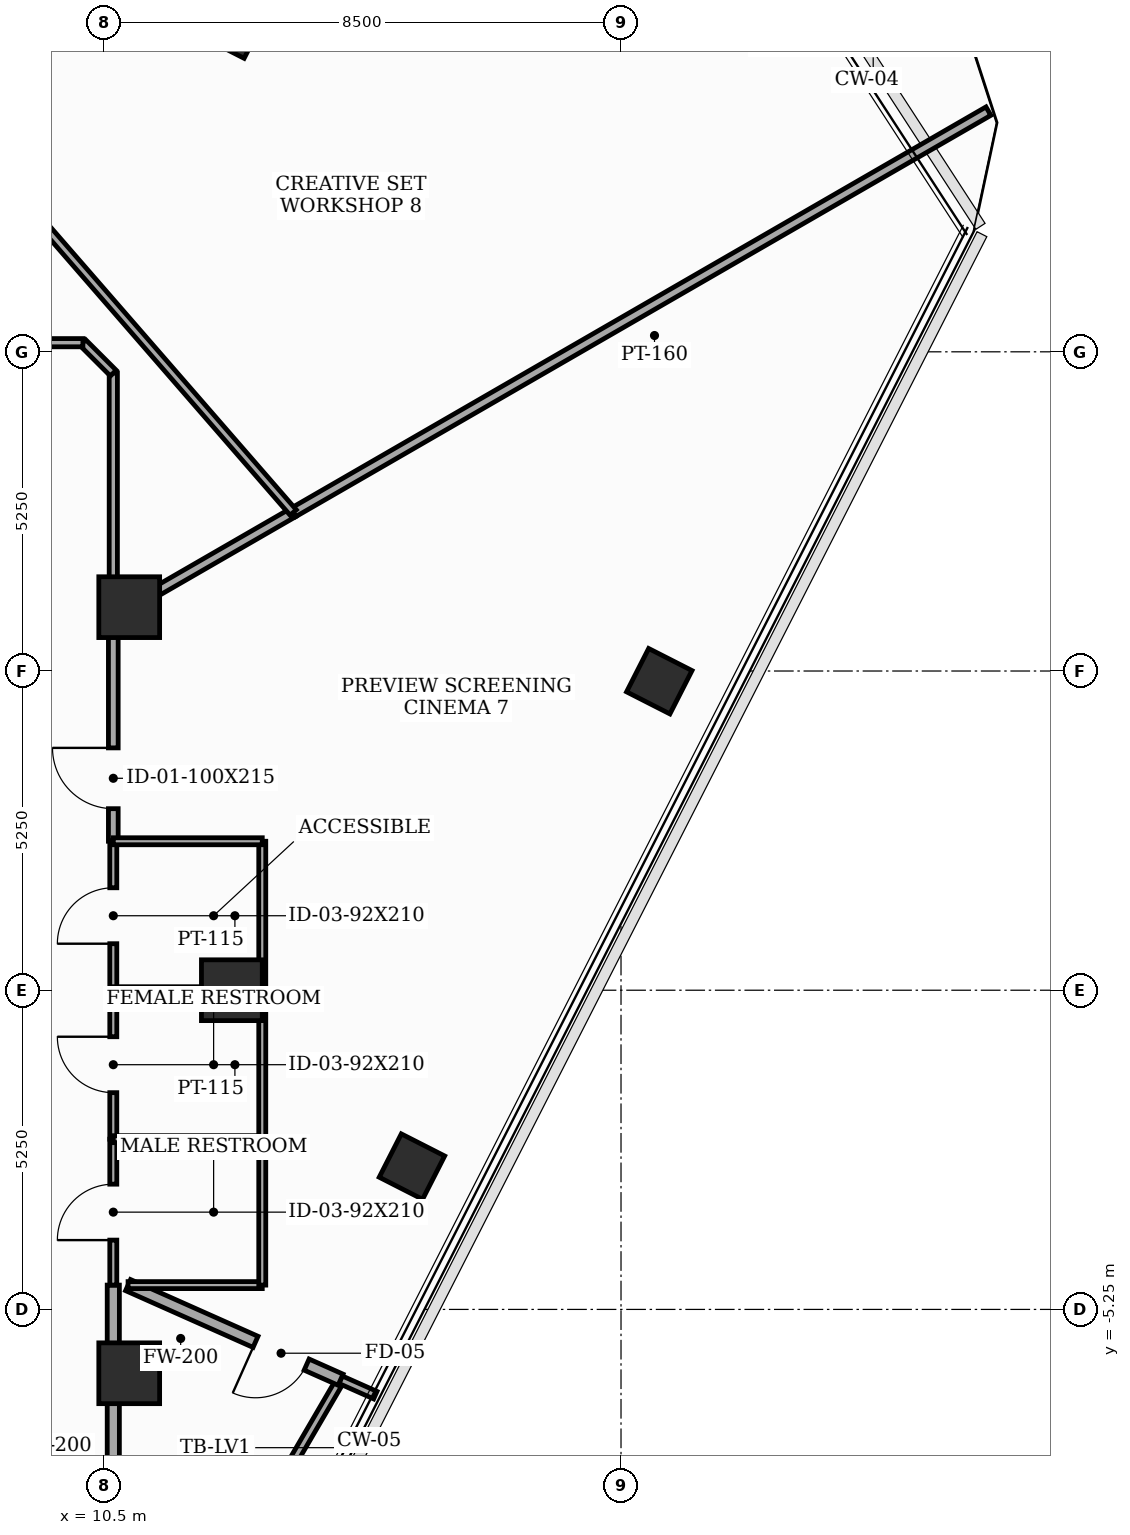
"""IFC4 building model, lengths in metres.
Left out: names, types, materials, properties, quantities, classifications, styles, units other than length and angle.
Written with IfcOpenShell. Run it as: python <this file> out.ifc"""

import sys

from ifc_helpers import new_model, si_unit, direction, frame, frame_2d, origin, origin_2d, place, context, subcontext, project, spatial, rectangle, extrude, element, fill, save


model = new_model("IFC4")
c1 = context("Model", 3, precision=1e-05, world=origin(), true_north=direction((0.0, 1.0)))
c2 = subcontext(c1, "Body", "Model", "MODEL_VIEW")
j1 = project(units=[si_unit("LENGTHUNIT", "METRE"), si_unit("PLANEANGLEUNIT", "RADIAN")], contexts=[c1])
p1 = place(None, origin())
s1 = spatial("IfcSite", under=j1, at=p1, CompositionType="ELEMENT")
p2 = place(p1, origin())
s2 = spatial("IfcBuilding", under=s1, at=p2, CompositionType="ELEMENT")
p3 = place(p2, frame((0.0, 0.0, 274.4)))
s3 = spatial("IfcBuildingStorey", under=s2, at=p3, CompositionType="ELEMENT", Elevation=274.4)
for number, where, z_axis, x_axis in (
    (1, (12.6, 0.0, 0.0), (0.0, 0.0, 1.0), (1.0, 0.0, 0.0)),
    (2, (10.912, 6.3, 0.0), (0.0, 0.0, 1.0), (1.0, 0.0, 0.0)),
    (3, (10.912, -6.3, 0.0), (0.0, 0.0, 1.0), (1.0, 0.0, 0.0)),
):
    element("IfcColumn", number, at=place(p3, frame(where, z_axis=z_axis, x_axis=x_axis)), inside=s3, PredefinedType="COLUMN", context=c2, shape_type="SweptSolid", body=[
        extrude(rectangle(XDim=1.0, YDim=1.0, at=origin_2d()), origin(), (0.0, 0.0, 1.0), 3.7),
    ])
for number, where, z_axis, x_axis in (
    (4, (15.562, -2.901, 0.0), (0.0, 0.0, 1.0), (0.454, 0.891, 0.0)),
    (5, (19.629, 5.082, 0.0), (0.0, 0.0, 1.0), (0.454, 0.891, 0.0)),
    (6, (12.627, 15.865, 0.0), (0.0, 0.0, 1.0), (0.454, 0.891, 0.0)),
):
    element("IfcColumn", number, at=place(p3, frame(where, z_axis=z_axis, x_axis=x_axis)), inside=s3, PredefinedType="COLUMN", context=c2, shape_type="SweptSolid", body=[
        extrude(rectangle(XDim=0.8, YDim=0.8, at=origin_2d()), origin(), (0.0, 0.0, 1.0), 3.7),
    ])
p4 = place(p3, frame((10.65, -10.15, 0.0), z_axis=(0.0, 0.0, 1.0), x_axis=(0.0, 1.0, 0.0)))
e7 = element("IfcWall", 7, at=p4, inside=s3, PredefinedType="SOLIDWALL", context=c2, shape_type="SweptSolid", body=[
    extrude(rectangle(XDim=5.3, YDim=0.2, at=frame_2d((2.65, 0.0))), origin(), (0.0, 0.0, 1.0), 2.045),
])
p5 = place(p3, frame((10.65, -4.85, 0.0), z_axis=(0.0, 0.0, 1.0), x_axis=(0.0, 1.0, 0.0)))
e8 = element("IfcWall", 8, at=p5, inside=s3, PredefinedType="PARTITIONING", context=c2, shape_type="SweptSolid", body=[
    extrude(rectangle(XDim=2.4, YDim=0.115, at=frame_2d((1.2, 0.0))), origin(), (0.0, 0.0, 1.0), 3.46),
])
p6 = place(p5, frame((0.74, 0.0, 0.0)))
e9 = element("IfcOpeningElement", 9, at=p6, cuts=e8, PredefinedType="OPENING", context=c2, shape_type="SweptSolid", body=[
    extrude(rectangle(XDim=0.92, YDim=2.1, at=frame_2d((0.46, 1.05))), frame((0.0, 0.067, 0.0), z_axis=(0.0, -1.0, 0.0), x_axis=(1.0, 0.0, 0.0)), (0.0, 0.0, 1.0), 0.135),
])
p7 = place(p3, frame((10.65, -2.45, 0.0), z_axis=(0.0, 0.0, 1.0), x_axis=(0.0, 1.0, 0.0)))
e10 = element("IfcWall", 10, at=p7, inside=s3, PredefinedType="PARTITIONING", context=c2, shape_type="SweptSolid", body=[
    extrude(rectangle(XDim=2.45, YDim=0.115, at=frame_2d((1.225, 0.0))), origin(), (0.0, 0.0, 1.0), 2.845),
])
p8 = place(p7, frame((0.765, 0.0, 0.0)))
e11 = element("IfcOpeningElement", 11, at=p8, cuts=e10, PredefinedType="OPENING", context=c2, shape_type="SweptSolid", body=[
    extrude(rectangle(XDim=0.92, YDim=2.1, at=frame_2d((0.46, 1.05))), frame((0.0, 0.067, 0.0), z_axis=(0.0, -1.0, 0.0), x_axis=(1.0, 0.0, 0.0)), (0.0, 0.0, 1.0), 0.135),
])
p9 = place(p3, frame((10.65, 0.0, 0.0), z_axis=(0.0, 0.0, 1.0), x_axis=(0.0, 1.0, 0.0)))
e12 = element("IfcWall", 12, at=p9, inside=s3, PredefinedType="PARTITIONING", context=c2, shape_type="SweptSolid", body=[
    extrude(rectangle(XDim=2.45, YDim=0.115, at=frame_2d((1.225, 0.0))), origin(), (0.0, 0.0, 1.0), 2.845),
])
p10 = place(p9, frame((0.765, 0.0, 0.0)))
e13 = element("IfcOpeningElement", 13, at=p10, cuts=e12, PredefinedType="OPENING", context=c2, shape_type="SweptSolid", body=[
    extrude(rectangle(XDim=0.92, YDim=2.1, at=frame_2d((0.46, 1.05))), frame((0.0, 0.067, 0.0), z_axis=(0.0, -1.0, 0.0), x_axis=(1.0, 0.0, 0.0)), (0.0, 0.0, 1.0), 0.135),
])
p11 = place(p3, frame((10.65, 2.45, 0.0), z_axis=(0.0, 0.0, 1.0), x_axis=(0.0, 1.0, 0.0)))
e14 = element("IfcWall", 14, at=p11, inside=s3, PredefinedType="PARTITIONING", context=c2, shape_type="SweptSolid", body=[
    extrude(rectangle(XDim=3.699, YDim=0.16, at=frame_2d((1.85, 0.0))), origin(), (0.0, 0.0, 1.0), 3.46),
])
p12 = place(p11, frame((0.536, 0.0, 0.0)))
e15 = element("IfcOpeningElement", 15, at=p12, cuts=e14, PredefinedType="OPENING", context=c2, shape_type="SweptSolid", body=[
    extrude(rectangle(XDim=1.0, YDim=2.15, at=frame_2d((0.5, 1.075))), frame((0.0, 0.09, 0.0), z_axis=(0.0, -1.0, 0.0), x_axis=(1.0, 0.0, 0.0)), (0.0, 0.0, 1.0), 0.18),
])
p13 = place(p3, frame((10.65, 6.149, 0.0), z_axis=(0.0, 0.0, 1.0), x_axis=(0.0, 1.0, 0.0)))
e16 = element("IfcWall", 16, at=p13, inside=s3, PredefinedType="PARTITIONING", context=c2, shape_type="SweptSolid", body=[
    extrude(rectangle(XDim=4.001, YDim=0.135, at=frame_2d((2.0, 0.0))), origin(), (0.0, 0.0, 1.0), 2.845),
])
p14 = place(p3, frame((10.65, 10.15, 0.0), z_axis=(0.0, 0.0, 1.0), x_axis=(-0.707106781187, 0.707106781187, 0.0)))
e17 = element("IfcWall", 17, at=p14, inside=s3, PredefinedType="PARTITIONING", context=c2, shape_type="SweptSolid", body=[
    extrude(rectangle(XDim=0.707, YDim=0.135, at=frame_2d((0.354, 0.0))), origin(), (0.0, 0.0, 1.0), 3.46),
])
p15 = place(p3, frame((10.15, 10.65, 0.0), z_axis=(0.0, 0.0, 1.0), x_axis=(-1.0, 0.0, 0.0)))
e18 = element("IfcWall", 18, at=p15, inside=s3, PredefinedType="PARTITIONING", context=c2, shape_type="SweptSolid", body=[
    extrude(rectangle(XDim=11.3, YDim=0.135, at=frame_2d((5.65, 0.0))), origin(), (0.0, 0.0, 1.0), 2.045),
])
p16 = place(p15, frame((6.531, 0.0, 0.0)))
e19 = element("IfcOpeningElement", 19, at=p16, cuts=e18, PredefinedType="OPENING", context=c2, shape_type="SweptSolid", body=[
    extrude(rectangle(XDim=0.95, YDim=2.0, at=frame_2d((0.475, 1.0))), frame((0.0, 0.077, 0.0), z_axis=(0.0, -1.0, 0.0), x_axis=(1.0, 0.0, 0.0)), (0.0, 0.0, 1.0), 0.155),
])
p17 = place(p3, frame((14.388, -6.406, 0.0), z_axis=(0.0, 0.0, 1.0), x_axis=(-0.50381969712, -0.863808840424, 0.0)))
e20 = element("IfcWall", 20, at=p17, inside=s3, PredefinedType="PARTITIONING", context=c2, shape_type="SweptSolid", body=[
    extrude(rectangle(XDim=3.845, YDim=0.135, at=frame_2d((1.922, 0.0))), origin(), (0.0, 0.0, 1.0), 2.045),
])
p18 = place(p3, frame((14.959, -6.66, 0.0), z_axis=(0.0, 0.0, 1.0), x_axis=(-0.91373105304, 0.40631953277, 0.0)))
e21 = element("IfcWall", 21, at=p18, inside=s3, PredefinedType="PARTITIONING", context=c2, shape_type="SweptSolid", body=[
    extrude(rectangle(XDim=0.625, YDim=0.135, at=frame_2d((0.313, 0.0))), origin(), (0.0, 0.0, 1.0), 3.46),
])
p19 = place(p3, frame((14.388, -6.406, 0.0), z_axis=(0.0, 0.0, 1.0), x_axis=(-0.913556095718, 0.406712748726, 0.0)))
e22 = element("IfcWall", 22, at=p19, inside=s3, PredefinedType="SOLIDWALL", context=c2, shape_type="SweptSolid", body=[
    extrude(rectangle(XDim=3.826, YDim=0.2, at=frame_2d((1.913, 0.0))), origin(), (0.0, 0.0, 1.0), 2.045),
])
p20 = place(p19, frame((0.611, 0.0, 0.0)))
e23 = element("IfcOpeningElement", 23, at=p20, cuts=e22, PredefinedType="OPENING", context=c2, shape_type="SweptSolid", body=[
    extrude(rectangle(XDim=0.92, YDim=2.0, at=frame_2d((0.46, 1.0))), frame((0.0, 0.11, 0.0), z_axis=(0.0, -1.0, 0.0), x_axis=(1.0, 0.0, 0.0)), (0.0, 0.0, 1.0), 0.22),
])
p21 = place(p3, frame((13.1, -2.45, 0.0), z_axis=(0.0, 0.0, 1.0), x_axis=(-1.0, 0.0, 0.0)))
e24 = element("IfcWall", 24, at=p21, inside=s3, PredefinedType="PARTITIONING", context=c2, shape_type="SweptSolid", body=[
    extrude(rectangle(XDim=2.45, YDim=0.115, at=frame_2d((1.225, 0.0))), origin(), (0.0, 0.0, 1.0), 2.845),
])
p22 = place(p3, frame((10.893, -4.85, 0.0), z_axis=(0.0, 0.0, 1.0), x_axis=(1.0, 0.0, 0.0)))
e25 = element("IfcWall", 25, at=p22, inside=s3, PredefinedType="PARTITIONING", context=c2, shape_type="SweptSolid", body=[
    extrude(rectangle(XDim=2.207, YDim=0.115, at=frame_2d((1.104, 0.0))), origin(), (0.0, 0.0, 1.0), 2.845),
])
p23 = place(p3, frame((13.1, -4.85, 0.0), z_axis=(0.0, 0.0, 1.0), x_axis=(0.0, 1.0, 0.0)))
e26 = element("IfcWall", 26, at=p23, inside=s3, PredefinedType="PARTITIONING", context=c2, shape_type="SweptSolid", body=[
    extrude(rectangle(XDim=2.4, YDim=0.115, at=frame_2d((1.2, 0.0))), origin(), (0.0, 0.0, 1.0), 3.46),
])
p24 = place(p3, frame((13.1, 0.0, 0.0), z_axis=(0.0, 0.0, 1.0), x_axis=(-1.0, 0.0, 0.0)))
e27 = element("IfcWall", 27, at=p24, inside=s3, PredefinedType="PARTITIONING", context=c2, shape_type="SweptSolid", body=[
    extrude(rectangle(XDim=2.45, YDim=0.115, at=frame_2d((1.225, 0.0))), origin(), (0.0, 0.0, 1.0), 2.045),
])
for number, where, z_axis, x_axis in (
    (28, (13.1, -2.45, 0.0), (0.0, 0.0, 1.0), (0.0, 1.0, 0.0)),
    (29, (13.1, 0.0, 0.0), (0.0, 0.0, 1.0), (0.0, 1.0, 0.0)),
):
    element("IfcWall", number, at=place(p3, frame(where, z_axis=z_axis, x_axis=x_axis)), inside=s3, PredefinedType="PARTITIONING", context=c2, shape_type="SweptSolid", body=[
        extrude(rectangle(XDim=2.45, YDim=0.115, at=frame_2d((1.225, 0.0))), origin(), (0.0, 0.0, 1.0), 2.045),
    ])
p25 = place(p3, frame((13.1, 2.45, 0.0), z_axis=(0.0, 0.0, 1.0), x_axis=(-1.0, 0.0, 0.0)))
e30 = element("IfcWall", 30, at=p25, inside=s3, PredefinedType="PARTITIONING", context=c2, shape_type="SweptSolid", body=[
    extrude(rectangle(XDim=2.45, YDim=0.115, at=frame_2d((1.225, 0.0))), origin(), (0.0, 0.0, 1.0), 2.845),
])
p26 = place(p3, frame((25.042, 14.458, 0.0), z_axis=(0.0, 0.0, 1.0), x_axis=(-0.866013134896, -0.500021249735, 0.0)))
e31 = element("IfcWall", 31, at=p26, inside=s3, PredefinedType="PARTITIONING", context=c2, shape_type="SweptSolid", body=[
    extrude(rectangle(XDim=13.203, YDim=0.16, at=frame_2d((6.601, 0.0))), origin(), (0.0, 0.0, 1.0), 2.045),
])
p27 = place(p3, frame((13.609, 7.857, 0.0), z_axis=(0.0, 0.0, 1.0), x_axis=(-0.866071357471, -0.499920397431, 0.0)))
e32 = element("IfcWall", 32, at=p27, inside=s3, PredefinedType="PARTITIONING", context=c2, shape_type="SweptSolid", body=[
    extrude(rectangle(XDim=3.417, YDim=0.16, at=frame_2d((1.708, 0.0))), origin(), (0.0, 0.0, 1.0), 2.045),
])
p28 = place(p3, frame((9.398, 12.701, 0.0), z_axis=(0.0, 0.0, 1.0), x_axis=(0.656069468174, -0.754700505452, 0.0)))
e33 = element("IfcWall", 33, at=p28, inside=s3, PredefinedType="PARTITIONING", context=c2, shape_type="SweptSolid", body=[
    extrude(rectangle(XDim=6.418, YDim=0.135, at=frame_2d((3.209, 0.0))), origin(), (0.0, 0.0, 1.0), 3.145),
])
p29 = place(p6, origin())
e34 = element("IfcDoor", 34, at=p29, inside=s3, OperationType="SINGLE_SWING_LEFT", PredefinedType="DOOR", context=c2, shape_type="SweptSolid", body=[
    extrude(rectangle(XDim=0.92, YDim=2.1, at=frame_2d((0.46, 1.05))), frame((0.0, 0.025, 0.0), z_axis=(0.0, -1.0, 0.0), x_axis=(1.0, 0.0, 0.0)), (0.0, 0.0, 1.0), 0.05),
])
fill(e9, e34)
p30 = place(p8, origin())
e35 = element("IfcDoor", 35, at=p30, inside=s3, OperationType="SINGLE_SWING_RIGHT", PredefinedType="DOOR", context=c2, shape_type="SweptSolid", body=[
    extrude(rectangle(XDim=0.92, YDim=2.1, at=frame_2d((0.46, 1.05))), frame((0.0, 0.025, 0.0), z_axis=(0.0, -1.0, 0.0), x_axis=(1.0, 0.0, 0.0)), (0.0, 0.0, 1.0), 0.05),
])
fill(e11, e35)
p31 = place(p10, origin())
e36 = element("IfcDoor", 36, at=p31, inside=s3, OperationType="SINGLE_SWING_LEFT", PredefinedType="DOOR", context=c2, shape_type="SweptSolid", body=[
    extrude(rectangle(XDim=0.92, YDim=2.1, at=frame_2d((0.46, 1.05))), frame((0.0, 0.025, 0.0), z_axis=(0.0, -1.0, 0.0), x_axis=(1.0, 0.0, 0.0)), (0.0, 0.0, 1.0), 0.05),
])
fill(e13, e36)
p32 = place(p12, origin())
e37 = element("IfcDoor", 37, at=p32, inside=s3, OperationType="SINGLE_SWING_RIGHT", PredefinedType="DOOR", context=c2, shape_type="SweptSolid", body=[
    extrude(rectangle(XDim=1.0, YDim=2.15, at=frame_2d((0.5, 1.075))), frame((0.0, 0.025, 0.0), z_axis=(0.0, -1.0, 0.0), x_axis=(1.0, 0.0, 0.0)), (0.0, 0.0, 1.0), 0.05),
])
fill(e15, e37)
p33 = place(p20, origin())
e38 = element("IfcDoor", 38, at=p33, inside=s3, OperationType="SINGLE_SWING_RIGHT", PredefinedType="DOOR", context=c2, shape_type="SweptSolid", body=[
    extrude(rectangle(XDim=0.92, YDim=2.0, at=frame_2d((0.46, 1.0))), frame((0.0, 0.025, 0.0), z_axis=(0.0, -1.0, 0.0), x_axis=(1.0, 0.0, 0.0)), (0.0, 0.0, 1.0), 0.05),
])
fill(e23, e38)
save(model, sys.argv[1])
